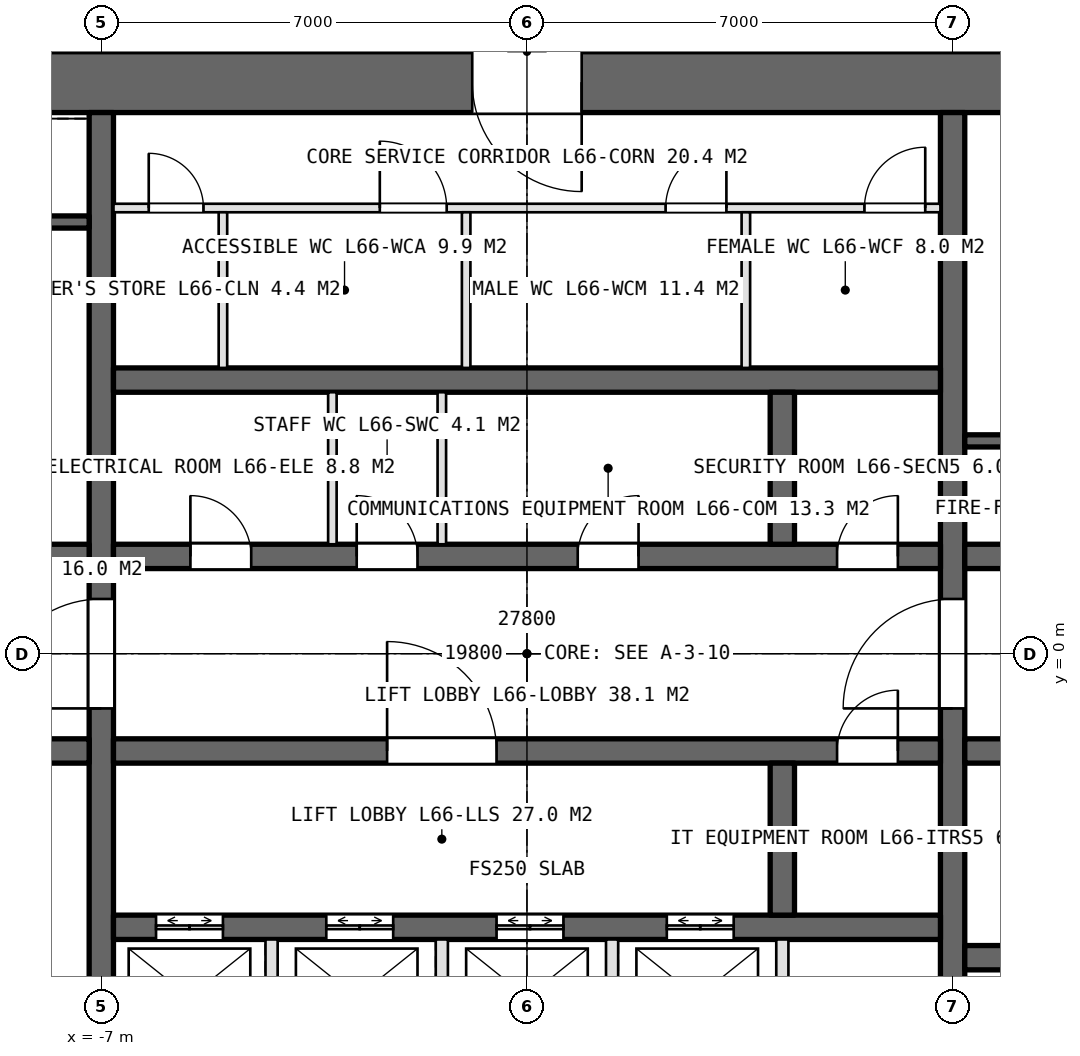
"""IFC4 building model, lengths in metres.
Left out: names, types, materials, properties, quantities, classifications, styles, units other than length and angle.
Written with IfcOpenShell. Run it as: python <this file> out.ifc"""

import sys

from ifc_helpers import new_model, si_unit, direction, frame, frame_2d, origin, place, context, subcontext, project, spatial, rectangle, extrude, element, fill, save


model = new_model("IFC4")
c1 = context("Model", 3, precision=1e-05, world=origin(), true_north=direction((0.0, 1.0)))
c2 = subcontext(c1, "Body", "Model", "MODEL_VIEW")
j1 = project(units=[si_unit("LENGTHUNIT", "METRE"), si_unit("PLANEANGLEUNIT", "RADIAN")], contexts=[c1])
p1 = place(None, origin())
s1 = spatial("IfcSite", under=j1, at=p1, CompositionType="ELEMENT")
p2 = place(p1, origin())
s2 = spatial("IfcBuilding", under=s1, at=p2, CompositionType="ELEMENT")
p3 = place(p2, frame((0.0, 0.0, 296.4)))
s3 = spatial("IfcBuildingStorey", under=s2, at=p3, CompositionType="ELEMENT", Elevation=296.4)
p4 = place(p3, frame((13.9, 9.4, 0.0), z_axis=(0.0, 0.0, 1.0), x_axis=(-1.0, 0.0, 0.0)))
e1 = element("IfcWall", 1, at=p4, inside=s3, PredefinedType="SHEAR", context=c2, shape_type="SweptSolid", body=[
    extrude(rectangle(XDim=27.8, YDim=1.0, at=frame_2d((13.9, 0.0))), origin(), (0.0, 0.0, 1.0), 4.2),
])
p5 = place(p4, frame((23.9, 0.0, 0.0)))
e2 = element("IfcOpeningElement", 2, at=p5, cuts=e1, PredefinedType="OPENING", context=c2, shape_type="SweptSolid", body=[
    extrude(rectangle(XDim=1.0, YDim=2.4, at=frame_2d((0.5, 1.2))), frame((0.0, 0.51, 0.0), z_axis=(0.0, -1.0, 0.0), x_axis=(1.0, 0.0, 0.0)), (0.0, 0.0, 1.0), 1.02),
])
p6 = place(p4, frame((13.0, 0.0, 0.0)))
e3 = element("IfcOpeningElement", 3, at=p6, cuts=e1, PredefinedType="OPENING", context=c2, shape_type="SweptSolid", body=[
    extrude(rectangle(XDim=1.8, YDim=2.4, at=frame_2d((0.9, 1.2))), frame((0.0, 0.51, 0.0), z_axis=(0.0, -1.0, 0.0), x_axis=(1.0, 0.0, 0.0)), (0.0, 0.0, 1.0), 1.02),
])
p7 = place(p3, frame((-7.0, -8.9, 0.0), z_axis=(0.0, 0.0, 1.0), x_axis=(0.0, 1.0, 0.0)))
e4 = element("IfcWall", 4, at=p7, inside=s3, PredefinedType="SHEAR", context=c2, shape_type="SweptSolid", body=[
    extrude(rectangle(XDim=17.8, YDim=0.4, at=frame_2d((8.9, 0.0))), origin(), (0.0, 0.0, 1.0), 4.2),
])
p8 = place(p7, frame((8.0, 0.0, 0.0)))
e5 = element("IfcOpeningElement", 5, at=p8, cuts=e4, PredefinedType="OPENING", context=c2, shape_type="SweptSolid", body=[
    extrude(rectangle(XDim=1.8, YDim=2.4, at=frame_2d((0.9, 1.2))), frame((0.0, 0.21, 0.0), z_axis=(0.0, -1.0, 0.0), x_axis=(1.0, 0.0, 0.0)), (0.0, 0.0, 1.0), 0.42),
])
p9 = place(p3, frame((7.0, -8.9, 0.0), z_axis=(0.0, 0.0, 1.0), x_axis=(0.0, 1.0, 0.0)))
e6 = element("IfcWall", 6, at=p9, inside=s3, PredefinedType="SHEAR", context=c2, shape_type="SweptSolid", body=[
    extrude(rectangle(XDim=17.8, YDim=0.4, at=frame_2d((8.9, 0.0))), origin(), (0.0, 0.0, 1.0), 4.2),
])
p10 = place(p9, frame((8.0, 0.0, 0.0)))
e7 = element("IfcOpeningElement", 7, at=p10, cuts=e6, PredefinedType="OPENING", context=c2, shape_type="SweptSolid", body=[
    extrude(rectangle(XDim=1.8, YDim=2.4, at=frame_2d((0.9, 1.2))), frame((0.0, 0.21, 0.0), z_axis=(0.0, -1.0, 0.0), x_axis=(1.0, 0.0, 0.0)), (0.0, 0.0, 1.0), 0.42),
])
p11 = place(p3, frame((-6.8, 1.6, 0.0), z_axis=(0.0, 0.0, 1.0), x_axis=(1.0, 0.0, 0.0)))
e8 = element("IfcWall", 8, at=p11, inside=s3, PredefinedType="SHEAR", context=c2, shape_type="SweptSolid", body=[
    extrude(rectangle(XDim=13.6, YDim=0.4, at=frame_2d((6.8, 0.0))), origin(), (0.0, 0.0, 1.0), 4.2),
])
p12 = place(p11, frame((1.265, 0.0, 0.0)))
e9 = element("IfcOpeningElement", 9, at=p12, cuts=e8, PredefinedType="OPENING", context=c2, shape_type="SweptSolid", body=[
    extrude(rectangle(XDim=1.0, YDim=2.4, at=frame_2d((0.5, 1.2))), frame((0.0, 0.21, 0.0), z_axis=(0.0, -1.0, 0.0), x_axis=(1.0, 0.0, 0.0)), (0.0, 0.0, 1.0), 0.42),
])
p13 = place(p11, frame((4.0, 0.0, 0.0)))
e10 = element("IfcOpeningElement", 10, at=p13, cuts=e8, PredefinedType="OPENING", context=c2, shape_type="SweptSolid", body=[
    extrude(rectangle(XDim=1.0, YDim=2.4, at=frame_2d((0.5, 1.2))), frame((0.0, 0.21, 0.0), z_axis=(0.0, -1.0, 0.0), x_axis=(1.0, 0.0, 0.0)), (0.0, 0.0, 1.0), 0.42),
])
p14 = place(p11, frame((7.635, 0.0, 0.0)))
e11 = element("IfcOpeningElement", 11, at=p14, cuts=e8, PredefinedType="OPENING", context=c2, shape_type="SweptSolid", body=[
    extrude(rectangle(XDim=1.0, YDim=2.4, at=frame_2d((0.5, 1.2))), frame((0.0, 0.21, 0.0), z_axis=(0.0, -1.0, 0.0), x_axis=(1.0, 0.0, 0.0)), (0.0, 0.0, 1.0), 0.42),
])
p15 = place(p11, frame((11.9, 0.0, 0.0)))
e12 = element("IfcOpeningElement", 12, at=p15, cuts=e8, PredefinedType="OPENING", context=c2, shape_type="SweptSolid", body=[
    extrude(rectangle(XDim=1.0, YDim=2.4, at=frame_2d((0.5, 1.2))), frame((0.0, 0.21, 0.0), z_axis=(0.0, -1.0, 0.0), x_axis=(1.0, 0.0, 0.0)), (0.0, 0.0, 1.0), 0.42),
])
p16 = place(p3, frame((-6.8, -1.6, 0.0), z_axis=(0.0, 0.0, 1.0), x_axis=(1.0, 0.0, 0.0)))
e13 = element("IfcWall", 13, at=p16, inside=s3, PredefinedType="SHEAR", context=c2, shape_type="SweptSolid", body=[
    extrude(rectangle(XDim=13.6, YDim=0.4, at=frame_2d((6.8, 0.0))), origin(), (0.0, 0.0, 1.0), 4.2),
])
p17 = place(p16, frame((11.9, 0.0, 0.0)))
e14 = element("IfcOpeningElement", 14, at=p17, cuts=e13, PredefinedType="OPENING", context=c2, shape_type="SweptSolid", body=[
    extrude(rectangle(XDim=1.0, YDim=2.4, at=frame_2d((0.5, 1.2))), frame((0.0, 0.21, 0.0), z_axis=(0.0, -1.0, 0.0), x_axis=(1.0, 0.0, 0.0)), (0.0, 0.0, 1.0), 0.42),
])
p18 = place(p16, frame((4.5, 0.0, 0.0)))
e15 = element("IfcOpeningElement", 15, at=p18, cuts=e13, PredefinedType="OPENING", context=c2, shape_type="SweptSolid", body=[
    extrude(rectangle(XDim=1.8, YDim=2.4, at=frame_2d((0.9, 1.2))), frame((0.0, 0.21, 0.0), z_axis=(0.0, -1.0, 0.0), x_axis=(1.0, 0.0, 0.0)), (0.0, 0.0, 1.0), 0.42),
])
p19 = place(p3, frame((-6.8, 4.5, 0.0), z_axis=(0.0, 0.0, 1.0), x_axis=(1.0, 0.0, 0.0)))
e16 = element("IfcWall", 16, at=p19, inside=s3, PredefinedType="SHEAR", context=c2, shape_type="SweptSolid", body=[
    extrude(rectangle(XDim=13.6, YDim=0.4, at=frame_2d((6.8, 0.0))), origin(), (0.0, 0.0, 1.0), 4.2),
])
p20 = place(p3, frame((-6.8, -4.5, 0.0), z_axis=(0.0, 0.0, 1.0), x_axis=(1.0, 0.0, 0.0)))
e17 = element("IfcWall", 17, at=p20, inside=s3, PredefinedType="SHEAR", context=c2, shape_type="SweptSolid", body=[
    extrude(rectangle(XDim=13.6, YDim=0.4, at=frame_2d((6.8, 0.0))), origin(), (0.0, 0.0, 1.0), 4.2),
])
p21 = place(p20, frame((0.7, 0.0, 0.0)))
e18 = element("IfcOpeningElement", 18, at=p21, cuts=e17, PredefinedType="OPENING", context=c2, shape_type="SweptSolid", body=[
    extrude(rectangle(XDim=1.1, YDim=2.4, at=frame_2d((0.55, 1.2))), frame((0.0, 0.21, 0.0), z_axis=(0.0, -1.0, 0.0), x_axis=(1.0, 0.0, 0.0)), (0.0, 0.0, 1.0), 0.42),
])
p22 = place(p20, frame((3.5, 0.0, 0.0)))
e19 = element("IfcOpeningElement", 19, at=p22, cuts=e17, PredefinedType="OPENING", context=c2, shape_type="SweptSolid", body=[
    extrude(rectangle(XDim=1.1, YDim=2.4, at=frame_2d((0.55, 1.2))), frame((0.0, 0.21, 0.0), z_axis=(0.0, -1.0, 0.0), x_axis=(1.0, 0.0, 0.0)), (0.0, 0.0, 1.0), 0.42),
])
p23 = place(p20, frame((6.3, 0.0, 0.0)))
e20 = element("IfcOpeningElement", 20, at=p23, cuts=e17, PredefinedType="OPENING", context=c2, shape_type="SweptSolid", body=[
    extrude(rectangle(XDim=1.1, YDim=2.4, at=frame_2d((0.55, 1.2))), frame((0.0, 0.21, 0.0), z_axis=(0.0, -1.0, 0.0), x_axis=(1.0, 0.0, 0.0)), (0.0, 0.0, 1.0), 0.42),
])
p24 = place(p20, frame((9.1, 0.0, 0.0)))
e21 = element("IfcOpeningElement", 21, at=p24, cuts=e17, PredefinedType="OPENING", context=c2, shape_type="SweptSolid", body=[
    extrude(rectangle(XDim=1.1, YDim=2.4, at=frame_2d((0.55, 1.2))), frame((0.0, 0.21, 0.0), z_axis=(0.0, -1.0, 0.0), x_axis=(1.0, 0.0, 0.0)), (0.0, 0.0, 1.0), 0.42),
])
for number, where, z_axis, x_axis in (
    (22, (-12.9, 1.6, 0.0), (0.0, 0.0, 1.0), (1.0, 0.0, 0.0)),
    (23, (-12.9, -1.6, 0.0), (0.0, 0.0, 1.0), (1.0, 0.0, 0.0)),
):
    element("IfcWall", number, at=place(p3, frame(where, z_axis=z_axis, x_axis=x_axis)), inside=s3, PredefinedType="SHEAR", context=c2, shape_type="SweptSolid", body=[
        extrude(rectangle(XDim=5.7, YDim=0.4, at=frame_2d((2.85, 0.0))), origin(), (0.0, 0.0, 1.0), 4.2),
    ])
p25 = place(p3, frame((7.2, 1.6, 0.0), z_axis=(0.0, 0.0, 1.0), x_axis=(1.0, 0.0, 0.0)))
e24 = element("IfcWall", 24, at=p25, inside=s3, PredefinedType="SHEAR", context=c2, shape_type="SweptSolid", body=[
    extrude(rectangle(XDim=5.7, YDim=0.4, at=frame_2d((2.85, 0.0))), origin(), (0.0, 0.0, 1.0), 4.2),
])
p26 = place(p25, frame((0.7, 0.0, 0.0)))
e25 = element("IfcOpeningElement", 25, at=p26, cuts=e24, PredefinedType="OPENING", context=c2, shape_type="SweptSolid", body=[
    extrude(rectangle(XDim=1.0, YDim=2.4, at=frame_2d((0.5, 1.2))), frame((0.0, 0.21, 0.0), z_axis=(0.0, -1.0, 0.0), x_axis=(1.0, 0.0, 0.0)), (0.0, 0.0, 1.0), 0.42),
])
p27 = place(p3, frame((7.2, -1.6, 0.0), z_axis=(0.0, 0.0, 1.0), x_axis=(1.0, 0.0, 0.0)))
e26 = element("IfcWall", 26, at=p27, inside=s3, PredefinedType="SHEAR", context=c2, shape_type="SweptSolid", body=[
    extrude(rectangle(XDim=5.7, YDim=0.4, at=frame_2d((2.85, 0.0))), origin(), (0.0, 0.0, 1.0), 4.2),
])
p28 = place(p27, frame((0.9, 0.0, 0.0)))
e27 = element("IfcOpeningElement", 27, at=p28, cuts=e26, PredefinedType="OPENING", context=c2, shape_type="SweptSolid", body=[
    extrude(rectangle(XDim=1.3, YDim=2.4, at=frame_2d((0.65, 1.2))), frame((0.0, 0.21, 0.0), z_axis=(0.0, -1.0, 0.0), x_axis=(1.0, 0.0, 0.0)), (0.0, 0.0, 1.0), 0.42),
])
p29 = place(p27, frame((3.95, 0.0, 0.0)))
e28 = element("IfcOpeningElement", 28, at=p29, cuts=e26, PredefinedType="OPENING", context=c2, shape_type="SweptSolid", body=[
    extrude(rectangle(XDim=1.3, YDim=2.4, at=frame_2d((0.65, 1.2))), frame((0.0, 0.21, 0.0), z_axis=(0.0, -1.0, 0.0), x_axis=(1.0, 0.0, 0.0)), (0.0, 0.0, 1.0), 0.42),
])
p30 = place(p3, frame((7.2, -5.0, 0.0), z_axis=(0.0, 0.0, 1.0), x_axis=(1.0, 0.0, 0.0)))
e29 = element("IfcWall", 29, at=p30, inside=s3, PredefinedType="SHEAR", context=c2, shape_type="SweptSolid", body=[
    extrude(rectangle(XDim=5.7, YDim=0.4, at=frame_2d((2.85, 0.0))), origin(), (0.0, 0.0, 1.0), 4.2),
])
for number, where, z_axis, x_axis in (
    (30, (4.2, 1.8, 0.0), (0.0, 0.0, 1.0), (0.0, 1.0, 0.0)),
    (31, (4.2, -4.3, 0.0), (0.0, 0.0, 1.0), (0.0, 1.0, 0.0)),
):
    element("IfcWall", number, at=place(p3, frame(where, z_axis=z_axis, x_axis=x_axis)), inside=s3, PredefinedType="SHEAR", context=c2, shape_type="SweptSolid", body=[
        extrude(rectangle(XDim=2.5, YDim=0.4, at=frame_2d((1.25, 0.0))), origin(), (0.0, 0.0, 1.0), 4.2),
    ])
p31 = place(p3, frame((-6.8, 7.33, 0.0), z_axis=(0.0, 0.0, 1.0), x_axis=(1.0, 0.0, 0.0)))
e32 = element("IfcWall", 32, at=p31, inside=s3, PredefinedType="PARTITIONING", context=c2, shape_type="SweptSolid", body=[
    extrude(rectangle(XDim=13.6, YDim=0.14, at=frame_2d((6.8, 0.0))), origin(), (0.0, 0.0, 1.0), 3.95),
])
p32 = place(p31, frame((0.58, 0.0, 0.0)))
e33 = element("IfcOpeningElement", 33, at=p32, cuts=e32, PredefinedType="OPENING", context=c2, shape_type="SweptSolid", body=[
    extrude(rectangle(XDim=0.9, YDim=2.4, at=frame_2d((0.45, 1.2))), frame((0.0, 0.08, 0.0), z_axis=(0.0, -1.0, 0.0), x_axis=(1.0, 0.0, 0.0)), (0.0, 0.0, 1.0), 0.16),
])
p33 = place(p31, frame((4.38, 0.0, 0.0)))
e34 = element("IfcOpeningElement", 34, at=p33, cuts=e32, PredefinedType="OPENING", context=c2, shape_type="SweptSolid", body=[
    extrude(rectangle(XDim=1.1, YDim=2.4, at=frame_2d((0.55, 1.2))), frame((0.0, 0.08, 0.0), z_axis=(0.0, -1.0, 0.0), x_axis=(1.0, 0.0, 0.0)), (0.0, 0.0, 1.0), 0.16),
])
p34 = place(p31, frame((9.08, 0.0, 0.0)))
e35 = element("IfcOpeningElement", 35, at=p34, cuts=e32, PredefinedType="OPENING", context=c2, shape_type="SweptSolid", body=[
    extrude(rectangle(XDim=1.0, YDim=2.4, at=frame_2d((0.5, 1.2))), frame((0.0, 0.08, 0.0), z_axis=(0.0, -1.0, 0.0), x_axis=(1.0, 0.0, 0.0)), (0.0, 0.0, 1.0), 0.16),
])
p35 = place(p31, frame((12.35, 0.0, 0.0)))
e36 = element("IfcOpeningElement", 36, at=p35, cuts=e32, PredefinedType="OPENING", context=c2, shape_type="SweptSolid", body=[
    extrude(rectangle(XDim=1.0, YDim=2.4, at=frame_2d((0.5, 1.2))), frame((0.0, 0.08, 0.0), z_axis=(0.0, -1.0, 0.0), x_axis=(1.0, 0.0, 0.0)), (0.0, 0.0, 1.0), 0.16),
])
for number, where, z_axis, x_axis in (
    (37, (-5.0, 4.7, 0.0), (0.0, 0.0, 1.0), (0.0, 1.0, 0.0)),
    (38, (-1.0, 4.7, 0.0), (0.0, 0.0, 1.0), (0.0, 1.0, 0.0)),
    (39, (3.6, 4.7, 0.0), (0.0, 0.0, 1.0), (0.0, 1.0, 0.0)),
):
    element("IfcWall", number, at=place(p3, frame(where, z_axis=z_axis, x_axis=x_axis)), inside=s3, PredefinedType="PARTITIONING", context=c2, shape_type="SweptSolid", body=[
        extrude(rectangle(XDim=2.56, YDim=0.14, at=frame_2d((1.28, 0.0))), origin(), (0.0, 0.0, 1.0), 3.95),
    ])
for number, where, z_axis, x_axis in (
    (40, (-3.2, 1.8, 0.0), (0.0, 0.0, 1.0), (0.0, 1.0, 0.0)),
    (41, (-1.4, 1.8, 0.0), (0.0, 0.0, 1.0), (0.0, 1.0, 0.0)),
):
    element("IfcWall", number, at=place(p3, frame(where, z_axis=z_axis, x_axis=x_axis)), inside=s3, PredefinedType="PARTITIONING", context=c2, shape_type="SweptSolid", body=[
        extrude(rectangle(XDim=2.5, YDim=0.14, at=frame_2d((1.25, 0.0))), origin(), (0.0, 0.0, 1.0), 3.95),
    ])
for number, where, z_axis, x_axis in (
    (42, (-4.2, -4.7, 0.0), (0.0, 0.0, 1.0), (0.0, -1.0, 0.0)),
    (43, (-1.4, -4.7, 0.0), (0.0, 0.0, 1.0), (0.0, -1.0, 0.0)),
    (44, (1.4, -4.7, 0.0), (0.0, 0.0, 1.0), (0.0, -1.0, 0.0)),
    (45, (4.2, -4.7, 0.0), (0.0, 0.0, 1.0), (0.0, -1.0, 0.0)),
):
    element("IfcWall", number, at=place(p3, frame(where, z_axis=z_axis, x_axis=x_axis)), inside=s3, PredefinedType="PARTITIONING", context=c2, shape_type="SweptSolid", body=[
        extrude(rectangle(XDim=4.2, YDim=0.2, at=frame_2d((2.1, 0.0))), origin(), (0.0, 0.0, 1.0), 4.2),
    ])
for number, where, z_axis, x_axis in (
    (46, (-9.15, 7.1, 0.0), (0.0, 0.0, 1.0), (1.0, 0.0, 0.0)),
    (47, (9.15, 3.5, 0.0), (0.0, 0.0, 1.0), (-1.0, 0.0, 0.0)),
):
    element("IfcWall", number, at=place(p3, frame(where, z_axis=z_axis, x_axis=x_axis)), inside=s3, PredefinedType="SOLIDWALL", context=c2, shape_type="SweptSolid", body=[
        extrude(rectangle(XDim=1.95, YDim=0.2, at=frame_2d((0.975, 0.0))), origin(), (0.0, 0.0, 1.0), 4.2),
    ])
p36 = place(p8, origin())
e48 = element("IfcDoor", 48, at=p36, inside=s3, OperationType="DOUBLE_DOOR_SINGLE_SWING", PredefinedType="DOOR", context=c2, shape_type="SweptSolid", body=[
    extrude(rectangle(XDim=1.8, YDim=2.4, at=frame_2d((0.9, 1.2))), frame((0.0, 0.025, 0.0), z_axis=(0.0, -1.0, 0.0), x_axis=(1.0, 0.0, 0.0)), (0.0, 0.0, 1.0), 0.05),
])
fill(e5, e48)
p37 = place(p10, origin())
e49 = element("IfcDoor", 49, at=p37, inside=s3, OperationType="DOUBLE_DOOR_SINGLE_SWING", PredefinedType="DOOR", context=c2, shape_type="SweptSolid", body=[
    extrude(rectangle(XDim=1.8, YDim=2.4, at=frame_2d((0.9, 1.2))), frame((0.0, 0.025, 0.0), z_axis=(0.0, -1.0, 0.0), x_axis=(1.0, 0.0, 0.0)), (0.0, 0.0, 1.0), 0.05),
])
fill(e7, e49)
p38 = place(p32, origin())
e50 = element("IfcDoor", 50, at=p38, inside=s3, OperationType="SINGLE_SWING_LEFT", PredefinedType="DOOR", context=c2, shape_type="SweptSolid", body=[
    extrude(rectangle(XDim=0.9, YDim=2.4, at=frame_2d((0.45, 1.2))), frame((0.0, 0.025, 0.0), z_axis=(0.0, -1.0, 0.0), x_axis=(1.0, 0.0, 0.0)), (0.0, 0.0, 1.0), 0.05),
])
fill(e33, e50)
p39 = place(p33, origin())
e51 = element("IfcDoor", 51, at=p39, inside=s3, OperationType="SINGLE_SWING_LEFT", PredefinedType="DOOR", context=c2, shape_type="SweptSolid", body=[
    extrude(rectangle(XDim=1.1, YDim=2.4, at=frame_2d((0.55, 1.2))), frame((0.0, 0.025, 0.0), z_axis=(0.0, -1.0, 0.0), x_axis=(1.0, 0.0, 0.0)), (0.0, 0.0, 1.0), 0.05),
])
fill(e34, e51)
p40 = place(p34, origin())
e52 = element("IfcDoor", 52, at=p40, inside=s3, OperationType="SINGLE_SWING_RIGHT", PredefinedType="DOOR", context=c2, shape_type="SweptSolid", body=[
    extrude(rectangle(XDim=1.0, YDim=2.4, at=frame_2d((0.5, 1.2))), frame((0.0, 0.025, 0.0), z_axis=(0.0, -1.0, 0.0), x_axis=(1.0, 0.0, 0.0)), (0.0, 0.0, 1.0), 0.05),
])
fill(e35, e52)
p41 = place(p35, origin())
e53 = element("IfcDoor", 53, at=p41, inside=s3, OperationType="SINGLE_SWING_RIGHT", PredefinedType="DOOR", context=c2, shape_type="SweptSolid", body=[
    extrude(rectangle(XDim=1.0, YDim=2.4, at=frame_2d((0.5, 1.2))), frame((0.0, 0.025, 0.0), z_axis=(0.0, -1.0, 0.0), x_axis=(1.0, 0.0, 0.0)), (0.0, 0.0, 1.0), 0.05),
])
fill(e36, e53)
p42 = place(p12, origin())
e54 = element("IfcDoor", 54, at=p42, inside=s3, OperationType="SINGLE_SWING_LEFT", PredefinedType="DOOR", context=c2, shape_type="SweptSolid", body=[
    extrude(rectangle(XDim=1.0, YDim=2.4, at=frame_2d((0.5, 1.2))), frame((0.0, 0.025, 0.0), z_axis=(0.0, -1.0, 0.0), x_axis=(1.0, 0.0, 0.0)), (0.0, 0.0, 1.0), 0.05),
])
fill(e9, e54)
p43 = place(p13, origin())
e55 = element("IfcDoor", 55, at=p43, inside=s3, OperationType="SINGLE_SWING_LEFT", PredefinedType="DOOR", context=c2, shape_type="SweptSolid", body=[
    extrude(rectangle(XDim=1.0, YDim=2.4, at=frame_2d((0.5, 1.2))), frame((0.0, 0.025, 0.0), z_axis=(0.0, -1.0, 0.0), x_axis=(1.0, 0.0, 0.0)), (0.0, 0.0, 1.0), 0.05),
])
fill(e10, e55)
p44 = place(p14, origin())
e56 = element("IfcDoor", 56, at=p44, inside=s3, OperationType="SINGLE_SWING_RIGHT", PredefinedType="DOOR", context=c2, shape_type="SweptSolid", body=[
    extrude(rectangle(XDim=1.0, YDim=2.4, at=frame_2d((0.5, 1.2))), frame((0.0, 0.025, 0.0), z_axis=(0.0, -1.0, 0.0), x_axis=(1.0, 0.0, 0.0)), (0.0, 0.0, 1.0), 0.05),
])
fill(e11, e56)
p45 = place(p15, origin())
e57 = element("IfcDoor", 57, at=p45, inside=s3, OperationType="SINGLE_SWING_RIGHT", PredefinedType="DOOR", context=c2, shape_type="SweptSolid", body=[
    extrude(rectangle(XDim=1.0, YDim=2.4, at=frame_2d((0.5, 1.2))), frame((0.0, 0.025, 0.0), z_axis=(0.0, -1.0, 0.0), x_axis=(1.0, 0.0, 0.0)), (0.0, 0.0, 1.0), 0.05),
])
fill(e12, e57)
p46 = place(p17, origin())
e58 = element("IfcDoor", 58, at=p46, inside=s3, OperationType="SINGLE_SWING_RIGHT", PredefinedType="DOOR", context=c2, shape_type="SweptSolid", body=[
    extrude(rectangle(XDim=1.0, YDim=2.4, at=frame_2d((0.5, 1.2))), frame((0.0, 0.025, 0.0), z_axis=(0.0, -1.0, 0.0), x_axis=(1.0, 0.0, 0.0)), (0.0, 0.0, 1.0), 0.05),
])
fill(e14, e58)
p47 = place(p18, origin())
e59 = element("IfcDoor", 59, at=p47, inside=s3, OperationType="DOUBLE_DOOR_SINGLE_SWING", PredefinedType="DOOR", context=c2, shape_type="SweptSolid", body=[
    extrude(rectangle(XDim=1.8, YDim=2.4, at=frame_2d((0.9, 1.2))), frame((0.0, 0.025, 0.0), z_axis=(0.0, -1.0, 0.0), x_axis=(1.0, 0.0, 0.0)), (0.0, 0.0, 1.0), 0.05),
])
fill(e15, e59)
p48 = place(p6, origin())
e60 = element("IfcDoor", 60, at=p48, inside=s3, OperationType="DOUBLE_DOOR_SINGLE_SWING", PredefinedType="DOOR", context=c2, shape_type="SweptSolid", body=[
    extrude(rectangle(XDim=1.8, YDim=2.4, at=frame_2d((0.9, 1.2))), frame((0.0, 0.025, 0.0), z_axis=(0.0, -1.0, 0.0), x_axis=(1.0, 0.0, 0.0)), (0.0, 0.0, 1.0), 0.05),
])
fill(e3, e60)
p49 = place(p21, origin())
e61 = element("IfcDoor", 61, at=p49, inside=s3, OperationType="DOUBLE_DOOR_SLIDING", PredefinedType="DOOR", context=c2, shape_type="SweptSolid", body=[
    extrude(rectangle(XDim=1.1, YDim=2.4, at=frame_2d((0.55, 1.2))), frame((0.0, 0.025, 0.0), z_axis=(0.0, -1.0, 0.0), x_axis=(1.0, 0.0, 0.0)), (0.0, 0.0, 1.0), 0.05),
])
fill(e18, e61)
p50 = place(p22, origin())
e62 = element("IfcDoor", 62, at=p50, inside=s3, OperationType="DOUBLE_DOOR_SLIDING", PredefinedType="DOOR", context=c2, shape_type="SweptSolid", body=[
    extrude(rectangle(XDim=1.1, YDim=2.4, at=frame_2d((0.55, 1.2))), frame((0.0, 0.025, 0.0), z_axis=(0.0, -1.0, 0.0), x_axis=(1.0, 0.0, 0.0)), (0.0, 0.0, 1.0), 0.05),
])
fill(e19, e62)
p51 = place(p23, origin())
e63 = element("IfcDoor", 63, at=p51, inside=s3, OperationType="DOUBLE_DOOR_SLIDING", PredefinedType="DOOR", context=c2, shape_type="SweptSolid", body=[
    extrude(rectangle(XDim=1.1, YDim=2.4, at=frame_2d((0.55, 1.2))), frame((0.0, 0.025, 0.0), z_axis=(0.0, -1.0, 0.0), x_axis=(1.0, 0.0, 0.0)), (0.0, 0.0, 1.0), 0.05),
])
fill(e20, e63)
p52 = place(p24, origin())
e64 = element("IfcDoor", 64, at=p52, inside=s3, OperationType="DOUBLE_DOOR_SLIDING", PredefinedType="DOOR", context=c2, shape_type="SweptSolid", body=[
    extrude(rectangle(XDim=1.1, YDim=2.4, at=frame_2d((0.55, 1.2))), frame((0.0, 0.025, 0.0), z_axis=(0.0, -1.0, 0.0), x_axis=(1.0, 0.0, 0.0)), (0.0, 0.0, 1.0), 0.05),
])
fill(e21, e64)
save(model, sys.argv[1])
